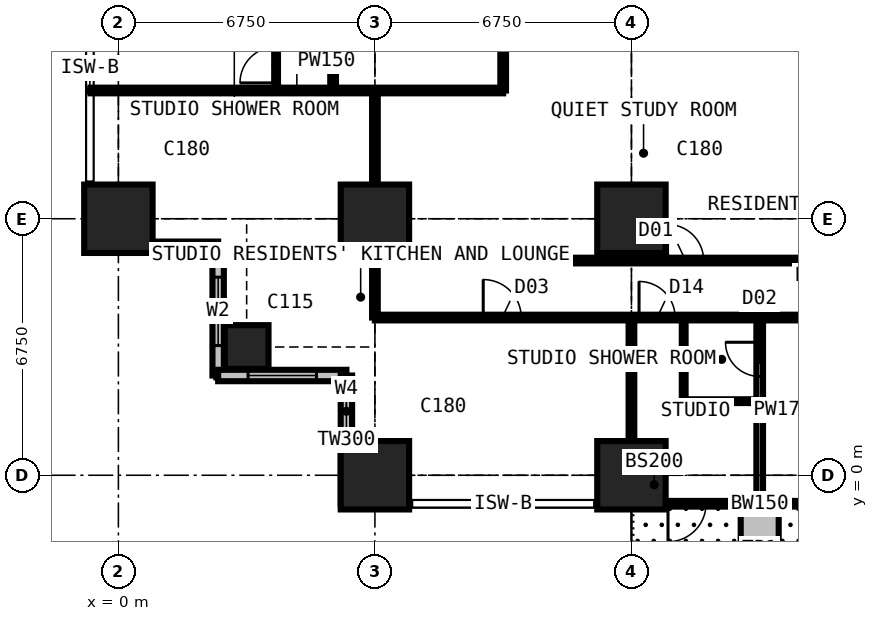
"""IFC4 building model, lengths in metres.
Left out: names, types, materials, properties, quantities, classifications, styles, units other than length and angle.
Written with IfcOpenShell. Run it as: python <this file> out.ifc"""

import sys

from ifc_helpers import new_model, si_unit, direction, frame, frame_2d, origin, origin_2d, place, context, subcontext, project, spatial, rectangle, extrude, element, fill, save


model = new_model("IFC4")
c1 = context("Model", 3, precision=1e-05, world=origin(), true_north=direction((0.0, 1.0)))
c2 = subcontext(c1, "Body", "Model", "MODEL_VIEW")
j1 = project(units=[si_unit("LENGTHUNIT", "METRE"), si_unit("PLANEANGLEUNIT", "RADIAN")], contexts=[c1])
p1 = place(None, origin())
s1 = spatial("IfcSite", under=j1, at=p1, CompositionType="ELEMENT")
p2 = place(p1, origin())
s2 = spatial("IfcBuilding", under=s1, at=p2, CompositionType="ELEMENT")
p3 = place(p2, frame((0.0, 0.0, 94.5)))
s3 = spatial("IfcBuildingStorey", under=s2, at=p3, CompositionType="ELEMENT", Elevation=94.5)
p4 = place(p3, frame((0.0, 6.75, 0.0), z_axis=(0.0, 0.0, 1.0), x_axis=(1.0, 0.0, 0.0)))
e1 = element("IfcColumn", 1, at=p4, inside=s3, PredefinedType="COLUMN", context=c2, shape_type="SweptSolid", body=[
    extrude(rectangle(XDim=1.8, YDim=1.8, at=origin_2d()), origin(), (0.0, 0.0, 1.0), 3.6),
])
p5 = place(p3, frame((3.375, 3.375, 0.0), z_axis=(0.0, 0.0, 1.0), x_axis=(1.0, 0.0, 0.0)))
e2 = element("IfcColumn", 2, at=p5, inside=s3, PredefinedType="COLUMN", context=c2, shape_type="SweptSolid", body=[
    extrude(rectangle(XDim=1.15, YDim=1.15, at=origin_2d()), origin(), (0.0, 0.0, 1.0), 3.6),
])
for number, where, z_axis, x_axis in (
    (3, (6.75, 0.0, 0.0), (0.0, 0.0, 1.0), (1.0, 0.0, 0.0)),
    (4, (6.75, 6.75, 0.0), (0.0, 0.0, 1.0), (1.0, 0.0, 0.0)),
    (5, (13.5, 0.0, 0.0), (0.0, 0.0, 1.0), (1.0, 0.0, 0.0)),
    (6, (13.5, 6.75, 0.0), (0.0, 0.0, 1.0), (1.0, 0.0, 0.0)),
):
    element("IfcColumn", number, at=place(p3, frame(where, z_axis=z_axis, x_axis=x_axis)), inside=s3, PredefinedType="COLUMN", context=c2, shape_type="SweptSolid", body=[
        extrude(rectangle(XDim=1.8, YDim=1.8, at=origin_2d()), origin(), (0.0, 0.0, 1.0), 3.6),
    ])
p6 = place(p3, frame((-0.75, 6.0, 0.0), z_axis=(0.0, 0.0, 1.0), x_axis=(1.0, 0.0, 0.0)))
e7 = element("IfcWall", 7, at=p6, inside=s3, PredefinedType="SOLIDWALL", context=c2, shape_type="SweptSolid", body=[
    extrude(rectangle(XDim=3.375, YDim=0.3, at=frame_2d((1.688, 0.0))), origin(), (0.0, 0.0, 1.0), 3.375),
])
p7 = place(p6, frame((1.833, 0.0, 0.9)))
e8 = element("IfcOpeningElement", 8, at=p7, cuts=e7, PredefinedType="OPENING", context=c2, shape_type="SweptSolid", body=[
    extrude(rectangle(XDim=1.2, YDim=1.8, at=frame_2d((0.6, 0.9))), frame((0.0, 0.16, 0.0), z_axis=(0.0, -1.0, 0.0), x_axis=(1.0, 0.0, 0.0)), (0.0, 0.0, 1.0), 0.32),
])
p8 = place(p3, frame((2.625, 6.0, 0.0), z_axis=(0.0, 0.0, 1.0), x_axis=(0.0, -1.0, 0.0)))
e9 = element("IfcWall", 9, at=p8, inside=s3, PredefinedType="SOLIDWALL", context=c2, shape_type="SweptSolid", body=[
    extrude(rectangle(XDim=3.375, YDim=0.3, at=frame_2d((1.688, 0.0))), origin(), (0.0, 0.0, 1.0), 3.375),
])
p9 = place(p8, frame((0.788, 0.0, 0.6)))
e10 = element("IfcOpeningElement", 10, at=p9, cuts=e9, PredefinedType="OPENING", context=c2, shape_type="SweptSolid", body=[
    extrude(rectangle(XDim=1.8, YDim=2.1, at=frame_2d((0.9, 1.05))), frame((0.0, 0.16, 0.0), z_axis=(0.0, -1.0, 0.0), x_axis=(1.0, 0.0, 0.0)), (0.0, 0.0, 1.0), 0.32),
])
p10 = place(p3, frame((2.625, 2.625, 0.0), z_axis=(0.0, 0.0, 1.0), x_axis=(1.0, 0.0, 0.0)))
e11 = element("IfcWall", 11, at=p10, inside=s3, PredefinedType="SOLIDWALL", context=c2, shape_type="SweptSolid", body=[
    extrude(rectangle(XDim=3.375, YDim=0.3, at=frame_2d((1.688, 0.0))), origin(), (0.0, 0.0, 1.0), 3.375),
])
p11 = place(p10, frame((0.788, 0.0, 0.6)))
e12 = element("IfcOpeningElement", 12, at=p11, cuts=e11, PredefinedType="OPENING", context=c2, shape_type="SweptSolid", body=[
    extrude(rectangle(XDim=1.8, YDim=2.1, at=frame_2d((0.9, 1.05))), frame((0.0, 0.16, 0.0), z_axis=(0.0, -1.0, 0.0), x_axis=(1.0, 0.0, 0.0)), (0.0, 0.0, 1.0), 0.32),
])
p12 = place(p3, frame((6.0, 2.625, 0.0), z_axis=(0.0, 0.0, 1.0), x_axis=(0.0, -1.0, 0.0)))
e13 = element("IfcWall", 13, at=p12, inside=s3, PredefinedType="SOLIDWALL", context=c2, shape_type="SweptSolid", body=[
    extrude(rectangle(XDim=3.375, YDim=0.3, at=frame_2d((1.688, 0.0))), origin(), (0.0, 0.0, 1.0), 3.375),
])
p13 = place(p12, frame((0.343, 0.0, 0.9)))
e14 = element("IfcOpeningElement", 14, at=p13, cuts=e13, PredefinedType="OPENING", context=c2, shape_type="SweptSolid", body=[
    extrude(rectangle(XDim=1.2, YDim=1.8, at=frame_2d((0.6, 0.9))), frame((0.0, 0.16, 0.0), z_axis=(0.0, -1.0, 0.0), x_axis=(1.0, 0.0, 0.0)), (0.0, 0.0, 1.0), 0.32),
])
p14 = place(p3, frame((20.25, -0.75, 0.0), z_axis=(0.0, 0.0, 1.0), x_axis=(-1.0, 0.0, 0.0)))
e15 = element("IfcWall", 15, at=p14, inside=s3, PredefinedType="SOLIDWALL", context=c2, shape_type="SweptSolid", body=[
    extrude(rectangle(XDim=6.75, YDim=0.15, at=frame_2d((3.375, 0.0))), origin(), (0.0, 0.0, 1.0), 3.375),
])
p15 = place(p14, frame((0.962, 0.0, 0.0)))
e16 = element("IfcOpeningElement", 16, at=p15, cuts=e15, PredefinedType="OPENING", context=c2, shape_type="SweptSolid", body=[
    extrude(rectangle(XDim=1.0, YDim=2.2, at=frame_2d((0.5, 1.1))), frame((0.0, 0.085, 0.0), z_axis=(0.0, -1.0, 0.0), x_axis=(1.0, 0.0, 0.0)), (0.0, 0.0, 1.0), 0.17),
])
p16 = place(p14, frame((2.025, 0.0, 0.9)))
e17 = element("IfcOpeningElement", 17, at=p16, cuts=e15, PredefinedType="OPENING", context=c2, shape_type="SweptSolid", body=[
    extrude(rectangle(XDim=1.2, YDim=1.8, at=frame_2d((0.6, 0.9))), frame((0.0, 0.085, 0.0), z_axis=(0.0, -1.0, 0.0), x_axis=(1.0, 0.0, 0.0)), (0.0, 0.0, 1.0), 0.17),
])
p17 = place(p14, frame((4.788, 0.0, 0.0)))
e18 = element("IfcOpeningElement", 18, at=p17, cuts=e15, PredefinedType="OPENING", context=c2, shape_type="SweptSolid", body=[
    extrude(rectangle(XDim=1.0, YDim=2.2, at=frame_2d((0.5, 1.1))), frame((0.0, 0.085, 0.0), z_axis=(0.0, -1.0, 0.0), x_axis=(1.0, 0.0, 0.0)), (0.0, 0.0, 1.0), 0.17),
])
p18 = place(p14, frame((3.525, 0.0, 0.9)))
e19 = element("IfcOpeningElement", 19, at=p18, cuts=e15, PredefinedType="OPENING", context=c2, shape_type="SweptSolid", body=[
    extrude(rectangle(XDim=1.2, YDim=1.8, at=frame_2d((0.6, 0.9))), frame((0.0, 0.085, 0.0), z_axis=(0.0, -1.0, 0.0), x_axis=(1.0, 0.0, 0.0)), (0.0, 0.0, 1.0), 0.17),
])
p19 = place(p3, frame((16.875, -0.85, 0.0), z_axis=(0.0, 0.0, 1.0), x_axis=(0.0, -1.0, 0.0)))
e20 = element("IfcWall", 20, at=p19, inside=s3, PredefinedType="USERDEFINED", context=c2, shape_type="SweptSolid", body=[
    extrude(rectangle(XDim=2.2, YDim=1.0, at=frame_2d((1.1, 0.0))), origin(), (0.0, 0.0, 1.0), 0.9),
])
p20 = place(p3, frame((-0.734, 10.125, 0.0), z_axis=(0.0, 0.0, 1.0), x_axis=(1.0, 0.0, 0.0)))
e21 = element("IfcWall", 21, at=p20, inside=s3, PredefinedType="PARTITIONING", context=c2, shape_type="SweptSolid", body=[
    extrude(rectangle(XDim=10.859, YDim=0.15, at=frame_2d((5.429, 0.0))), origin(), (0.0, 0.0, 1.0), 3.375),
])
p21 = place(p3, frame((4.15, 10.125, 0.0), z_axis=(0.0, 0.0, 1.0), x_axis=(0.0, 1.0, 0.0)))
e22 = element("IfcWall", 22, at=p21, inside=s3, PredefinedType="PARTITIONING", context=c2, shape_type="SweptSolid", body=[
    extrude(rectangle(XDim=16.875, YDim=0.1, at=frame_2d((8.438, 0.0))), origin(), (0.0, 0.0, 1.0), 3.375),
])
p22 = place(p21, frame((13.7, 0.0, 0.0)))
e23 = element("IfcOpeningElement", 23, at=p22, cuts=e22, PredefinedType="OPENING", context=c2, shape_type="SweptSolid", body=[
    extrude(rectangle(XDim=0.95, YDim=2.2, at=frame_2d((0.475, 1.1))), frame((0.0, 0.06, 0.0), z_axis=(0.0, -1.0, 0.0), x_axis=(1.0, 0.0, 0.0)), (0.0, 0.0, 1.0), 0.12),
])
p23 = place(p21, frame((0.2, 0.0, 0.0)))
e24 = element("IfcOpeningElement", 24, at=p23, cuts=e22, PredefinedType="OPENING", context=c2, shape_type="SweptSolid", body=[
    extrude(rectangle(XDim=0.95, YDim=2.2, at=frame_2d((0.475, 1.1))), frame((0.0, 0.06, 0.0), z_axis=(0.0, -1.0, 0.0), x_axis=(1.0, 0.0, 0.0)), (0.0, 0.0, 1.0), 0.12),
])
p24 = place(p21, frame((3.625, 0.0, 0.0)))
e25 = element("IfcOpeningElement", 25, at=p24, cuts=e22, PredefinedType="OPENING", context=c2, shape_type="SweptSolid", body=[
    extrude(rectangle(XDim=0.95, YDim=2.2, at=frame_2d((0.475, 1.1))), frame((0.0, 0.06, 0.0), z_axis=(0.0, -1.0, 0.0), x_axis=(1.0, 0.0, 0.0)), (0.0, 0.0, 1.0), 0.12),
])
p25 = place(p21, frame((7.0, 0.0, 0.0)))
e26 = element("IfcOpeningElement", 26, at=p25, cuts=e22, PredefinedType="OPENING", context=c2, shape_type="SweptSolid", body=[
    extrude(rectangle(XDim=0.95, YDim=2.2, at=frame_2d((0.475, 1.1))), frame((0.0, 0.06, 0.0), z_axis=(0.0, -1.0, 0.0), x_axis=(1.0, 0.0, 0.0)), (0.0, 0.0, 1.0), 0.12),
])
p26 = place(p21, frame((10.375, 0.0, 0.0)))
e27 = element("IfcOpeningElement", 27, at=p26, cuts=e22, PredefinedType="OPENING", context=c2, shape_type="SweptSolid", body=[
    extrude(rectangle(XDim=0.95, YDim=2.2, at=frame_2d((0.475, 1.1))), frame((0.0, 0.06, 0.0), z_axis=(0.0, -1.0, 0.0), x_axis=(1.0, 0.0, 0.0)), (0.0, 0.0, 1.0), 0.12),
])
p27 = place(p3, frame((5.65, 10.125, 0.0), z_axis=(0.0, 0.0, 1.0), x_axis=(0.0, 1.0, 0.0)))
e28 = element("IfcWall", 28, at=p27, inside=s3, PredefinedType="PARTITIONING", context=c2, shape_type="SweptSolid", body=[
    extrude(rectangle(XDim=10.762, YDim=0.15, at=frame_2d((5.381, 0.0))), origin(), (0.0, 0.0, 1.0), 3.375),
])
p28 = place(p27, frame((4.9, 0.0, 0.0)))
e29 = element("IfcOpeningElement", 29, at=p28, cuts=e28, PredefinedType="OPENING", context=c2, shape_type="SweptSolid", body=[
    extrude(rectangle(XDim=0.95, YDim=2.2, at=frame_2d((0.475, 1.1))), frame((0.0, 0.085, 0.0), z_axis=(0.0, -1.0, 0.0), x_axis=(1.0, 0.0, 0.0)), (0.0, 0.0, 1.0), 0.17),
])
p29 = place(p3, frame((6.75, 4.15, 0.0), z_axis=(0.0, 0.0, 1.0), x_axis=(0.0, 1.0, 0.0)))
e30 = element("IfcWall", 30, at=p29, inside=s3, PredefinedType="PARTITIONING", context=c2, shape_type="SweptSolid", body=[
    extrude(rectangle(XDim=5.975, YDim=0.15, at=frame_2d((2.988, 0.0))), origin(), (0.0, 0.0, 1.0), 2.877),
])
p30 = place(p3, frame((6.75, 4.15, 0.0), z_axis=(0.0, 0.0, 1.0), x_axis=(1.0, 0.0, 0.0)))
e31 = element("IfcWall", 31, at=p30, inside=s3, PredefinedType="PARTITIONING", context=c2, shape_type="SweptSolid", body=[
    extrude(rectangle(XDim=23.625, YDim=0.15, at=frame_2d((11.812, 0.0))), origin(), (0.0, 0.0, 1.0), 3.375),
])
p31 = place(p30, frame((2.85, 0.0, 0.0)))
e32 = element("IfcOpeningElement", 32, at=p31, cuts=e31, PredefinedType="OPENING", context=c2, shape_type="SweptSolid", body=[
    extrude(rectangle(XDim=1.0, YDim=2.2, at=frame_2d((0.5, 1.1))), frame((0.0, 0.085, 0.0), z_axis=(0.0, -1.0, 0.0), x_axis=(1.0, 0.0, 0.0)), (0.0, 0.0, 1.0), 0.17),
])
p32 = place(p30, frame((18.475, 0.0, 0.0)))
e33 = element("IfcOpeningElement", 33, at=p32, cuts=e31, PredefinedType="OPENING", context=c2, shape_type="SweptSolid", body=[
    extrude(rectangle(XDim=0.95, YDim=2.2, at=frame_2d((0.475, 1.1))), frame((0.0, 0.085, 0.0), z_axis=(0.0, -1.0, 0.0), x_axis=(1.0, 0.0, 0.0)), (0.0, 0.0, 1.0), 0.17),
])
p33 = place(p30, frame((11.725, 0.0, 0.0)))
e34 = element("IfcOpeningElement", 34, at=p33, cuts=e31, PredefinedType="OPENING", context=c2, shape_type="SweptSolid", body=[
    extrude(rectangle(XDim=0.95, YDim=2.2, at=frame_2d((0.475, 1.1))), frame((0.0, 0.085, 0.0), z_axis=(0.0, -1.0, 0.0), x_axis=(1.0, 0.0, 0.0)), (0.0, 0.0, 1.0), 0.17),
])
p34 = place(p30, frame((6.95, 0.0, 0.0)))
e35 = element("IfcOpeningElement", 35, at=p34, cuts=e31, PredefinedType="OPENING", context=c2, shape_type="SweptSolid", body=[
    extrude(rectangle(XDim=0.95, YDim=2.2, at=frame_2d((0.475, 1.1))), frame((0.0, 0.085, 0.0), z_axis=(0.0, -1.0, 0.0), x_axis=(1.0, 0.0, 0.0)), (0.0, 0.0, 1.0), 0.17),
])
p35 = place(p3, frame((6.75, 5.65, 0.0), z_axis=(0.0, 0.0, 1.0), x_axis=(1.0, 0.0, 0.0)))
e36 = element("IfcWall", 36, at=p35, inside=s3, PredefinedType="PARTITIONING", context=c2, shape_type="SweptSolid", body=[
    extrude(rectangle(XDim=14.137, YDim=0.15, at=frame_2d((7.069, 0.0))), origin(), (0.0, 0.0, 1.0), 3.375),
])
p36 = place(p35, frame((7.7, 0.0, 0.0)))
e37 = element("IfcOpeningElement", 37, at=p36, cuts=e36, PredefinedType="OPENING", context=c2, shape_type="SweptSolid", body=[
    extrude(rectangle(XDim=0.95, YDim=2.2, at=frame_2d((0.475, 1.1))), frame((0.0, 0.085, 0.0), z_axis=(0.0, -1.0, 0.0), x_axis=(1.0, 0.0, 0.0)), (0.0, 0.0, 1.0), 0.17),
])
p37 = place(p3, frame((10.125, 10.125, 0.0), z_axis=(0.0, 0.0, 1.0), x_axis=(0.0, 1.0, 0.0)))
e38 = element("IfcWall", 38, at=p37, inside=s3, PredefinedType="PARTITIONING", context=c2, shape_type="SweptSolid", body=[
    extrude(rectangle(XDim=1.175, YDim=0.15, at=frame_2d((0.587, 0.0))), origin(), (0.0, 0.0, 1.0), 3.375),
])
p38 = place(p3, frame((13.5, -0.734, 0.0), z_axis=(0.0, 0.0, 1.0), x_axis=(0.0, 1.0, 0.0)))
e39 = element("IfcWall", 39, at=p38, inside=s3, PredefinedType="PARTITIONING", context=c2, shape_type="SweptSolid", body=[
    extrude(rectangle(XDim=4.884, YDim=0.15, at=frame_2d((2.442, 0.0))), origin(), (0.0, 0.0, 1.0), 2.877),
])
p39 = place(p3, frame((14.875, 1.95, 0.0), z_axis=(0.0, 0.0, 1.0), x_axis=(0.0, 1.0, 0.0)))
e40 = element("IfcWall", 40, at=p39, inside=s3, PredefinedType="PARTITIONING", context=c2, shape_type="SweptSolid", body=[
    extrude(rectangle(XDim=2.2, YDim=0.1, at=frame_2d((1.1, 0.0))), origin(), (0.0, 0.0, 1.0), 3.375),
])
p40 = place(p3, frame((14.875, 1.95, 0.0), z_axis=(0.0, 0.0, 1.0), x_axis=(1.0, 0.0, 0.0)))
e41 = element("IfcWall", 41, at=p40, inside=s3, PredefinedType="PARTITIONING", context=c2, shape_type="SweptSolid", body=[
    extrude(rectangle(XDim=2.0, YDim=0.1, at=frame_2d((1.0, 0.0))), origin(), (0.0, 0.0, 1.0), 3.375),
])
p41 = place(p3, frame((16.875, -0.734, 0.0), z_axis=(0.0, 0.0, 1.0), x_axis=(0.0, 1.0, 0.0)))
e42 = element("IfcWall", 42, at=p41, inside=s3, PredefinedType="PARTITIONING", context=c2, shape_type="SweptSolid", body=[
    extrude(rectangle(XDim=4.884, YDim=0.175, at=frame_2d((2.442, 0.0))), origin(), (0.0, 0.0, 1.0), 3.375),
])
p42 = place(p41, frame((3.334, 0.0, 0.0)))
e43 = element("IfcOpeningElement", 43, at=p42, cuts=e42, PredefinedType="OPENING", context=c2, shape_type="SweptSolid", body=[
    extrude(rectangle(XDim=0.9, YDim=2.2, at=frame_2d((0.45, 1.1))), frame((0.0, 0.097, 0.0), z_axis=(0.0, -1.0, 0.0), x_axis=(1.0, 0.0, 0.0)), (0.0, 0.0, 1.0), 0.195),
])
p43 = place(p7, origin())
e44 = element("IfcWindow", 44, at=p43, inside=s3, PartitioningType="SINGLE_PANEL", PredefinedType="WINDOW", context=c2, shape_type="SweptSolid", body=[
    extrude(rectangle(XDim=1.2, YDim=1.8, at=frame_2d((0.6, 0.9))), frame((0.0, 0.03, 0.0), z_axis=(0.0, -1.0, 0.0), x_axis=(1.0, 0.0, 0.0)), (0.0, 0.0, 1.0), 0.06),
])
fill(e8, e44)
p44 = place(p9, origin())
e45 = element("IfcWindow", 45, at=p44, inside=s3, PartitioningType="SINGLE_PANEL", PredefinedType="WINDOW", context=c2, shape_type="SweptSolid", body=[
    extrude(rectangle(XDim=1.8, YDim=2.1, at=frame_2d((0.9, 1.05))), frame((0.0, 0.03, 0.0), z_axis=(0.0, -1.0, 0.0), x_axis=(1.0, 0.0, 0.0)), (0.0, 0.0, 1.0), 0.06),
])
fill(e10, e45)
p45 = place(p11, origin())
e46 = element("IfcWindow", 46, at=p45, inside=s3, PartitioningType="SINGLE_PANEL", PredefinedType="WINDOW", context=c2, shape_type="SweptSolid", body=[
    extrude(rectangle(XDim=1.8, YDim=2.1, at=frame_2d((0.9, 1.05))), frame((0.0, 0.03, 0.0), z_axis=(0.0, -1.0, 0.0), x_axis=(1.0, 0.0, 0.0)), (0.0, 0.0, 1.0), 0.06),
])
fill(e12, e46)
p46 = place(p13, origin())
e47 = element("IfcWindow", 47, at=p46, inside=s3, PartitioningType="SINGLE_PANEL", PredefinedType="WINDOW", context=c2, shape_type="SweptSolid", body=[
    extrude(rectangle(XDim=1.2, YDim=1.8, at=frame_2d((0.6, 0.9))), frame((0.0, 0.03, 0.0), z_axis=(0.0, -1.0, 0.0), x_axis=(1.0, 0.0, 0.0)), (0.0, 0.0, 1.0), 0.06),
])
fill(e14, e47)
p47 = place(p16, origin())
e48 = element("IfcWindow", 48, at=p47, inside=s3, PartitioningType="SINGLE_PANEL", PredefinedType="WINDOW", context=c2, shape_type="SweptSolid", body=[
    extrude(rectangle(XDim=1.2, YDim=1.8, at=frame_2d((0.6, 0.9))), frame((0.0, 0.03, 0.0), z_axis=(0.0, -1.0, 0.0), x_axis=(1.0, 0.0, 0.0)), (0.0, 0.0, 1.0), 0.06),
])
fill(e17, e48)
p48 = place(p17, origin())
e49 = element("IfcDoor", 49, at=p48, inside=s3, OperationType="SINGLE_SWING_RIGHT", PredefinedType="DOOR", context=c2, shape_type="SweptSolid", body=[
    extrude(rectangle(XDim=1.0, YDim=2.2, at=frame_2d((0.5, 1.1))), frame((0.0, 0.025, 0.0), z_axis=(0.0, -1.0, 0.0), x_axis=(1.0, 0.0, 0.0)), (0.0, 0.0, 1.0), 0.05),
])
fill(e18, e49)
p49 = place(p18, origin())
e50 = element("IfcWindow", 50, at=p49, inside=s3, PartitioningType="SINGLE_PANEL", PredefinedType="WINDOW", context=c2, shape_type="SweptSolid", body=[
    extrude(rectangle(XDim=1.2, YDim=1.8, at=frame_2d((0.6, 0.9))), frame((0.0, 0.03, 0.0), z_axis=(0.0, -1.0, 0.0), x_axis=(1.0, 0.0, 0.0)), (0.0, 0.0, 1.0), 0.06),
])
fill(e19, e50)
p50 = place(p31, origin())
e51 = element("IfcDoor", 51, at=p50, inside=s3, OperationType="SINGLE_SWING_LEFT", PredefinedType="DOOR", context=c2, shape_type="SweptSolid", body=[
    extrude(rectangle(XDim=1.0, YDim=2.2, at=frame_2d((0.5, 1.1))), frame((0.0, 0.025, 0.0), z_axis=(0.0, -1.0, 0.0), x_axis=(1.0, 0.0, 0.0)), (0.0, 0.0, 1.0), 0.05),
])
fill(e32, e51)
p51 = place(p34, origin())
e52 = element("IfcDoor", 52, at=p51, inside=s3, OperationType="SINGLE_SWING_LEFT", PredefinedType="DOOR", context=c2, shape_type="SweptSolid", body=[
    extrude(rectangle(XDim=0.95, YDim=2.2, at=frame_2d((0.475, 1.1))), frame((0.0, 0.025, 0.0), z_axis=(0.0, -1.0, 0.0), x_axis=(1.0, 0.0, 0.0)), (0.0, 0.0, 1.0), 0.05),
])
fill(e35, e52)
p52 = place(p42, origin())
e53 = element("IfcDoor", 53, at=p52, inside=s3, OperationType="SINGLE_SWING_RIGHT", PredefinedType="DOOR", context=c2, shape_type="SweptSolid", body=[
    extrude(rectangle(XDim=0.9, YDim=2.2, at=frame_2d((0.45, 1.1))), frame((0.0, 0.025, 0.0), z_axis=(0.0, -1.0, 0.0), x_axis=(1.0, 0.0, 0.0)), (0.0, 0.0, 1.0), 0.05),
])
fill(e43, e53)
p53 = place(p36, origin())
e54 = element("IfcDoor", 54, at=p53, inside=s3, OperationType="SINGLE_SWING_LEFT", PredefinedType="DOOR", context=c2, shape_type="SweptSolid", body=[
    extrude(rectangle(XDim=0.95, YDim=2.2, at=frame_2d((0.475, 1.1))), frame((0.0, 0.025, 0.0), z_axis=(0.0, -1.0, 0.0), x_axis=(1.0, 0.0, 0.0)), (0.0, 0.0, 1.0), 0.05),
])
fill(e37, e54)
p54 = place(p23, origin())
e55 = element("IfcDoor", 55, at=p54, inside=s3, OperationType="SINGLE_SWING_LEFT", PredefinedType="DOOR", context=c2, shape_type="SweptSolid", body=[
    extrude(rectangle(XDim=0.95, YDim=2.2, at=frame_2d((0.475, 1.1))), frame((0.0, 0.025, 0.0), z_axis=(0.0, -1.0, 0.0), x_axis=(1.0, 0.0, 0.0)), (0.0, 0.0, 1.0), 0.05),
])
fill(e24, e55)
save(model, sys.argv[1])
